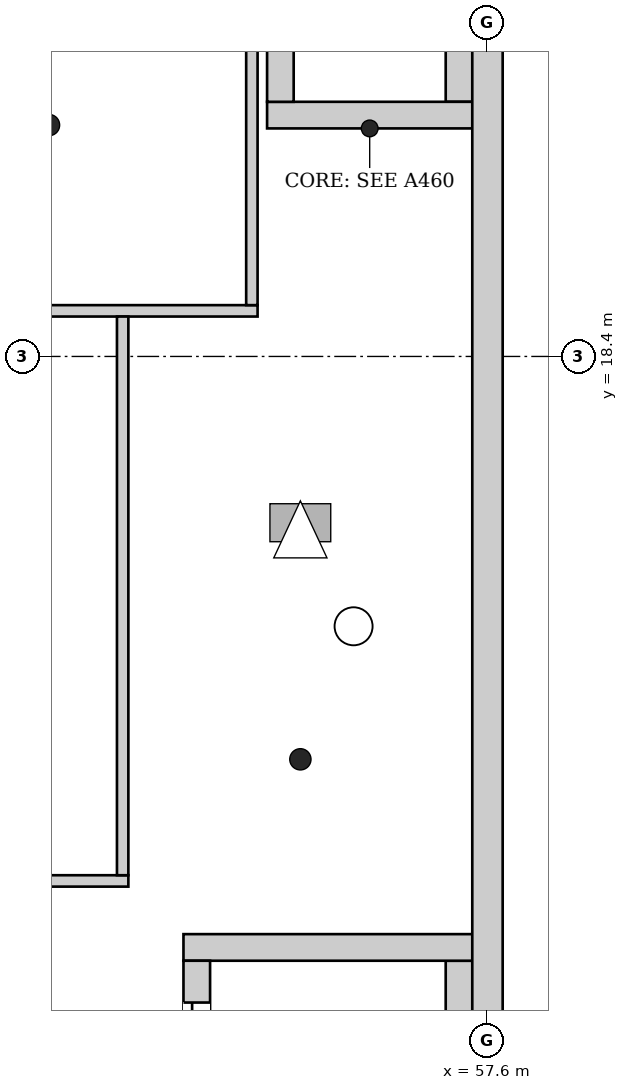
"""IFC4 building model, lengths in metres.
Left out: names, types, materials, properties, quantities, classifications, styles, units other than length and angle.
Written with IfcOpenShell. Run it as: python <this file> out.ifc"""

import sys

from ifc_helpers import new_model, si_unit, direction, frame, frame_2d, origin, place, context, subcontext, project, spatial, rectangle, extrude, element, fill, save


model = new_model("IFC4")
c1 = context("Model", 3, precision=1e-05, world=origin(), true_north=direction((0.0, 1.0)))
c2 = subcontext(c1, "Body", "Model", "MODEL_VIEW")
j1 = project(units=[si_unit("LENGTHUNIT", "METRE"), si_unit("PLANEANGLEUNIT", "RADIAN")], contexts=[c1])
p1 = place(None, origin())
s1 = spatial("IfcSite", under=j1, at=p1, CompositionType="ELEMENT")
p2 = place(p1, origin())
s2 = spatial("IfcBuilding", under=s1, at=p2, CompositionType="ELEMENT")
p3 = place(p2, frame((0.0, 0.0, 26.7)))
s3 = spatial("IfcBuildingStorey", under=s2, at=p3, CompositionType="ELEMENT", Elevation=26.7)
p4 = place(p3, frame((57.6, -0.2, 0.0), z_axis=(0.0, 0.0, 1.0), x_axis=(0.0, 1.0, 0.0)))
e1 = element("IfcWall", 1, at=p4, inside=s3, PredefinedType="SHEAR", context=c2, shape_type="SweptSolid", body=[
    extrude(rectangle(XDim=46.88, YDim=0.4, at=frame_2d((23.44, 0.0))), origin(), (0.0, 0.0, 1.0), 5.2),
])
p5 = place(p3, frame((53.6, 10.625, 0.0), z_axis=(0.0, 0.0, 1.0), x_axis=(1.0, 0.0, 0.0)))
e2 = element("IfcWall", 2, at=p5, inside=s3, PredefinedType="SHEAR", context=c2, shape_type="SweptSolid", body=[
    extrude(rectangle(XDim=3.8, YDim=0.35, at=frame_2d((1.9, 0.0))), origin(), (0.0, 0.0, 1.0), 5.2),
])
p6 = place(p3, frame((53.775, 8.25, 0.0), z_axis=(0.0, 0.0, 1.0), x_axis=(0.0, 1.0, 0.0)))
e3 = element("IfcWall", 3, at=p6, inside=s3, PredefinedType="SHEAR", context=c2, shape_type="SweptSolid", body=[
    extrude(rectangle(XDim=2.2, YDim=0.35, at=frame_2d((1.1, 0.0))), origin(), (0.0, 0.0, 1.0), 5.2),
])
p7 = place(p6, frame((0.55, 0.0, 0.0)))
e4 = element("IfcOpeningElement", 4, at=p7, cuts=e3, PredefinedType="OPENING", context=c2, shape_type="SweptSolid", body=[
    extrude(rectangle(XDim=1.1, YDim=2.1, at=frame_2d((0.55, 1.05))), frame((0.0, 0.185, 0.0), z_axis=(0.0, -1.0, 0.0), x_axis=(1.0, 0.0, 0.0)), (0.0, 0.0, 1.0), 0.37),
])
p8 = place(p3, frame((57.225, 8.25, 0.0), z_axis=(0.0, 0.0, 1.0), x_axis=(0.0, 1.0, 0.0)))
e5 = element("IfcWall", 5, at=p8, inside=s3, PredefinedType="SHEAR", context=c2, shape_type="SweptSolid", body=[
    extrude(rectangle(XDim=2.2, YDim=0.35, at=frame_2d((1.1, 0.0))), origin(), (0.0, 0.0, 1.0), 5.2),
])
p9 = place(p3, frame((54.7, 21.575, 0.0), z_axis=(0.0, 0.0, 1.0), x_axis=(1.0, 0.0, 0.0)))
e6 = element("IfcWall", 6, at=p9, inside=s3, PredefinedType="SHEAR", context=c2, shape_type="SweptSolid", body=[
    extrude(rectangle(XDim=2.7, YDim=0.35, at=frame_2d((1.35, 0.0))), origin(), (0.0, 0.0, 1.0), 5.2),
])
for number, where, z_axis, x_axis in (
    (7, (54.875, 21.75, 0.0), (0.0, 0.0, 1.0), (0.0, 1.0, 0.0)),
    (8, (57.225, 21.75, 0.0), (0.0, 0.0, 1.0), (0.0, 1.0, 0.0)),
):
    element("IfcWall", number, at=place(p3, frame(where, z_axis=z_axis, x_axis=x_axis)), inside=s3, PredefinedType="SHEAR", context=c2, shape_type="SweptSolid", body=[
        extrude(rectangle(XDim=3.5, YDim=0.35, at=frame_2d((1.75, 0.0))), origin(), (0.0, 0.0, 1.0), 5.2),
    ])
p10 = place(p3, frame((27.206, 11.5, 0.0), z_axis=(0.0, 0.0, 1.0), x_axis=(1.0, 0.0, 0.0)))
e9 = element("IfcWall", 9, at=p10, inside=s3, PredefinedType="PARTITIONING", context=c2, shape_type="SweptSolid", body=[
    extrude(rectangle(XDim=25.669, YDim=0.15, at=frame_2d((12.834, 0.0))), origin(), (0.0, 0.0, 1.0), 4.85),
])
p11 = place(p10, frame((13.094, 0.0, 0.0)))
e10 = element("IfcOpeningElement", 10, at=p11, cuts=e9, PredefinedType="OPENING", context=c2, shape_type="SweptSolid", body=[
    extrude(rectangle(XDim=1.0, YDim=2.1, at=frame_2d((0.5, 1.05))), frame((0.0, 0.085, 0.0), z_axis=(0.0, -1.0, 0.0), x_axis=(1.0, 0.0, 0.0)), (0.0, 0.0, 1.0), 0.17),
])
p12 = place(p10, frame((17.894, 0.0, 0.0)))
e11 = element("IfcOpeningElement", 11, at=p12, cuts=e9, PredefinedType="OPENING", context=c2, shape_type="SweptSolid", body=[
    extrude(rectangle(XDim=1.0, YDim=2.1, at=frame_2d((0.5, 1.05))), frame((0.0, 0.085, 0.0), z_axis=(0.0, -1.0, 0.0), x_axis=(1.0, 0.0, 0.0)), (0.0, 0.0, 1.0), 0.17),
])
p13 = place(p10, frame((22.659, 0.0, 0.0)))
e12 = element("IfcOpeningElement", 12, at=p13, cuts=e9, PredefinedType="OPENING", context=c2, shape_type="SweptSolid", body=[
    extrude(rectangle(XDim=1.0, YDim=2.1, at=frame_2d((0.5, 1.05))), frame((0.0, 0.085, 0.0), z_axis=(0.0, -1.0, 0.0), x_axis=(1.0, 0.0, 0.0)), (0.0, 0.0, 1.0), 0.17),
])
p14 = place(p3, frame((48.55, 19.0, 0.0), z_axis=(0.0, 0.0, 1.0), x_axis=(1.0, 0.0, 0.0)))
e13 = element("IfcWall", 13, at=p14, inside=s3, PredefinedType="PARTITIONING", context=c2, shape_type="SweptSolid", body=[
    extrude(rectangle(XDim=6.025, YDim=0.15, at=frame_2d((3.012, 0.0))), origin(), (0.0, 0.0, 1.0), 4.85),
])
p15 = place(p3, frame((52.8, 11.575, 0.0), z_axis=(0.0, 0.0, 1.0), x_axis=(0.0, 1.0, 0.0)))
e14 = element("IfcWall", 14, at=p15, inside=s3, PredefinedType="PARTITIONING", context=c2, shape_type="SweptSolid", body=[
    extrude(rectangle(XDim=7.35, YDim=0.15, at=frame_2d((3.675, 0.0))), origin(), (0.0, 0.0, 1.0), 4.85),
])
p16 = place(p3, frame((54.5, 19.075, 0.0), z_axis=(0.0, 0.0, 1.0), x_axis=(0.0, 1.0, 0.0)))
e15 = element("IfcWall", 15, at=p16, inside=s3, PredefinedType="PARTITIONING", context=c2, shape_type="SweptSolid", body=[
    extrude(rectangle(XDim=8.0, YDim=0.15, at=frame_2d((4.0, 0.0))), origin(), (0.0, 0.0, 1.0), 4.85),
])
p17 = place(p7, origin())
e16 = element("IfcDoor", 16, at=p17, inside=s3, OperationType="DOUBLE_DOOR_SLIDING", PredefinedType="DOOR", context=c2, shape_type="SweptSolid", body=[
    extrude(rectangle(XDim=1.1, YDim=2.1, at=frame_2d((0.55, 1.05))), frame((0.0, 0.025, 0.0), z_axis=(0.0, -1.0, 0.0), x_axis=(1.0, 0.0, 0.0)), (0.0, 0.0, 1.0), 0.05),
])
fill(e4, e16)
save(model, sys.argv[1])
